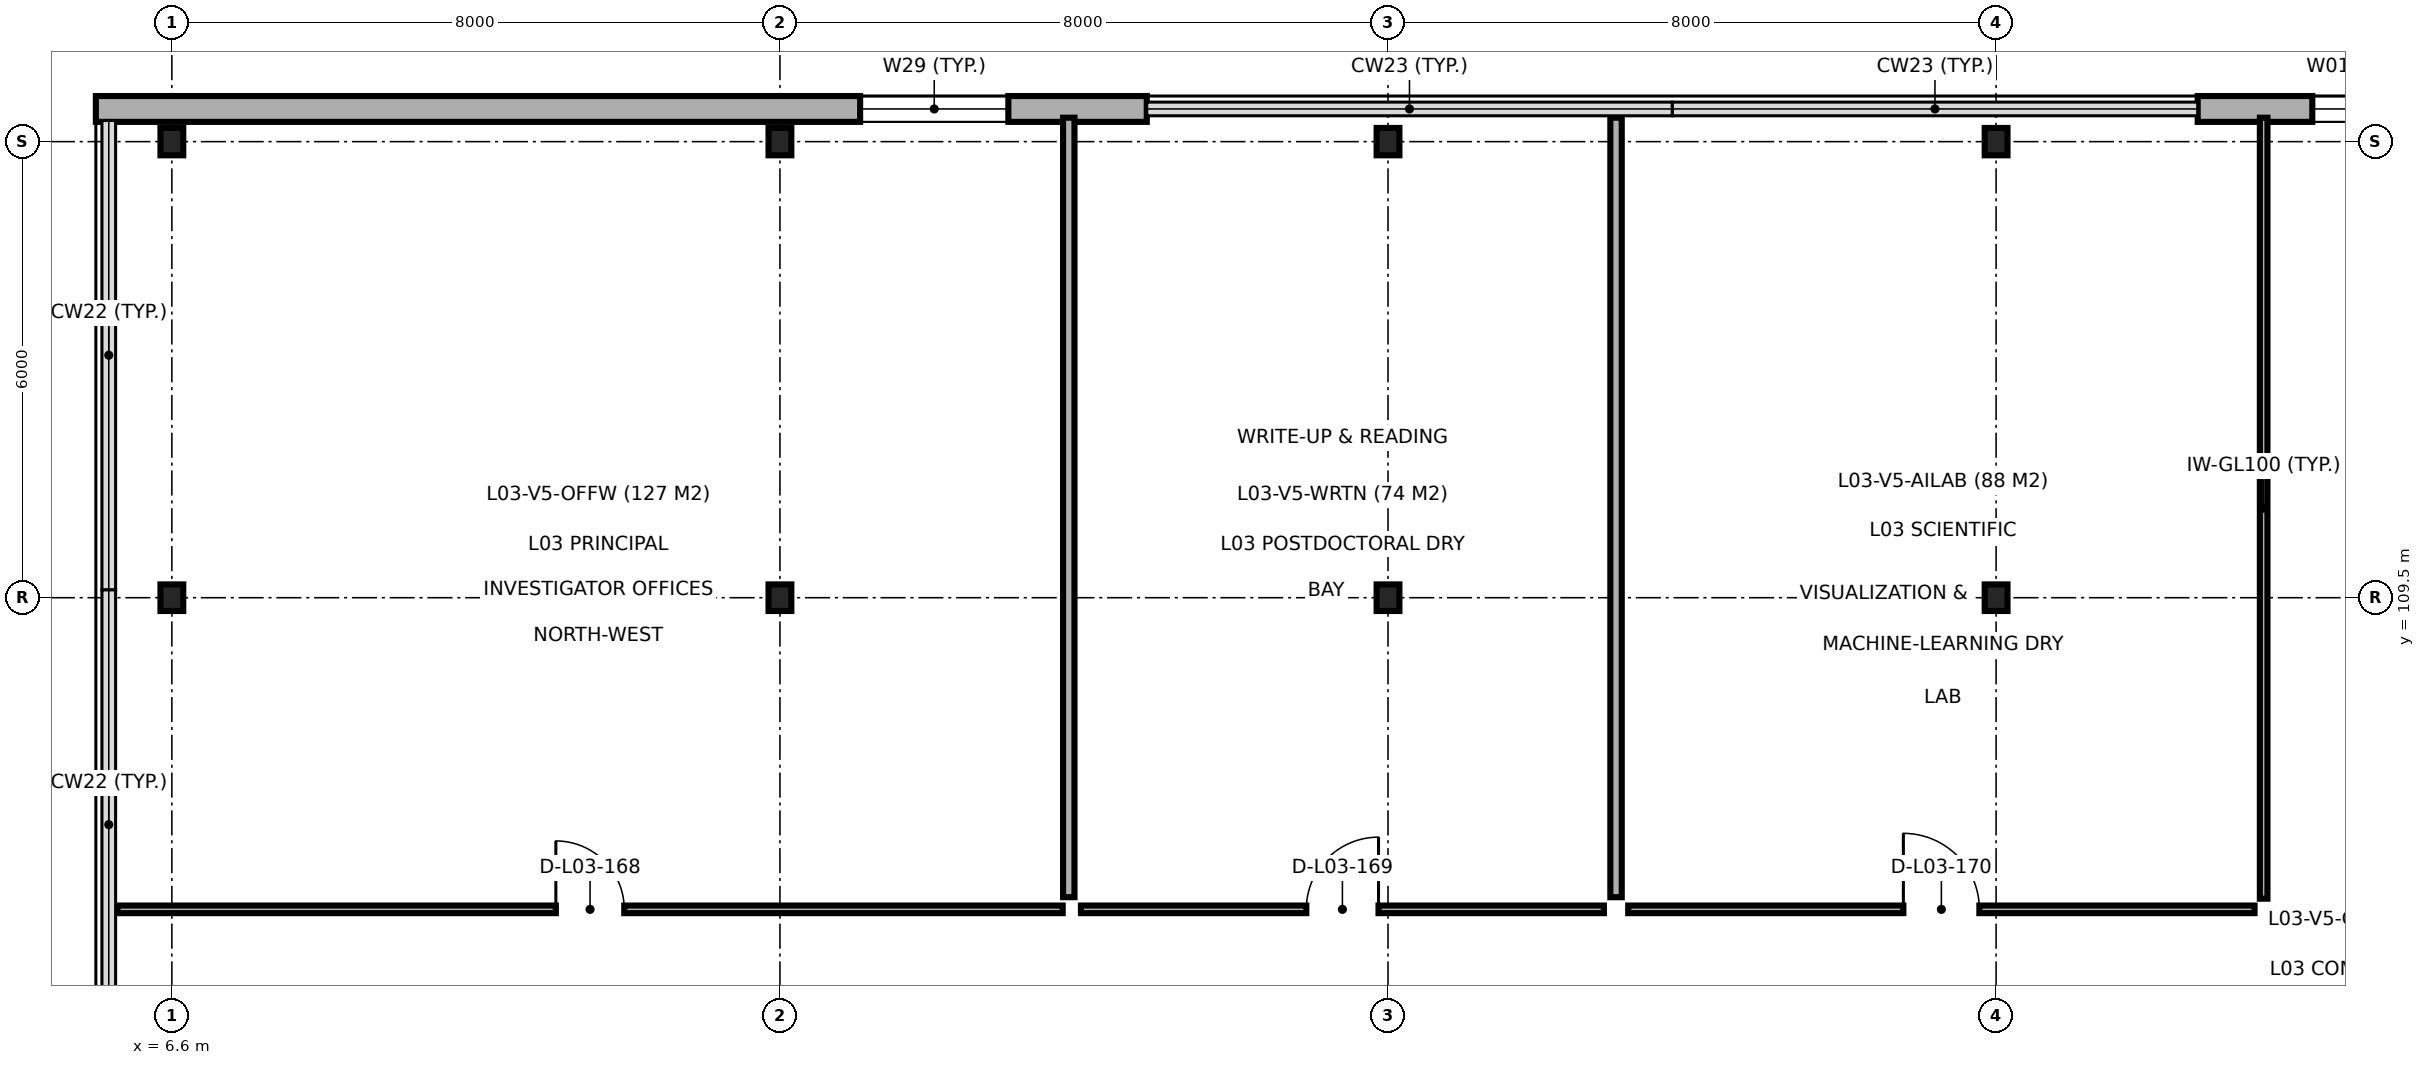
"""IFC4 building model, lengths in metres.
Left out: names, types, materials, properties, quantities, classifications, styles, units other than length and angle.
Written with IfcOpenShell. Run it as: python <this file> out.ifc"""

import sys

from ifc_helpers import new_model, si_unit, direction, frame, frame_2d, origin, origin_2d, place, context, subcontext, project, spatial, rectangle, i_section, extrude, element, fill, save


model = new_model("IFC4")
c1 = context("Model", 3, precision=1e-05, world=origin(), true_north=direction((0.0, 1.0)))
c2 = subcontext(c1, "Body", "Model", "MODEL_VIEW")
j1 = project(units=[si_unit("LENGTHUNIT", "METRE"), si_unit("PLANEANGLEUNIT", "RADIAN")], contexts=[c1])
p1 = place(None, origin())
s1 = spatial("IfcSite", under=j1, at=p1, CompositionType="ELEMENT")
p2 = place(p1, origin())
s2 = spatial("IfcBuilding", under=s1, at=p2, CompositionType="ELEMENT")
p3 = place(p2, frame((0.0, 0.0, 13.8)))
s3 = spatial("IfcBuildingStorey", under=s2, at=p3, CompositionType="ELEMENT", Elevation=13.8)
p4 = place(p3, frame((6.6, 109.5, 0.0), z_axis=(0.0, 0.0, 1.0), x_axis=(1.0, 0.0, 0.0)))
e1 = element("IfcColumn", 1, at=p4, inside=s3, PredefinedType="COLUMN", context=c2, shape_type="SweptSolid", body=[
    extrude(i_section(OverallWidth=0.3, OverallDepth=0.35, WebThickness=0.01, FlangeThickness=0.018, FilletRadius=0.027, at=origin_2d()), origin(), (0.0, 0.0, 1.0), 4.5),
])
p5 = place(p3, frame((6.6, 115.5, 0.0), z_axis=(0.0, 0.0, 1.0), x_axis=(1.0, 0.0, 0.0)))
e2 = element("IfcColumn", 2, at=p5, inside=s3, PredefinedType="COLUMN", context=c2, shape_type="SweptSolid", body=[
    extrude(i_section(OverallWidth=0.3, OverallDepth=0.36, WebThickness=0.012, FlangeThickness=0.022, FilletRadius=0.027, at=origin_2d()), origin(), (0.0, 0.0, 1.0), 4.5),
])
p6 = place(p3, frame((14.6, 109.5, 0.0), z_axis=(0.0, 0.0, 1.0), x_axis=(1.0, 0.0, 0.0)))
e3 = element("IfcColumn", 3, at=p6, inside=s3, PredefinedType="COLUMN", context=c2, shape_type="SweptSolid", body=[
    extrude(i_section(OverallWidth=0.3, OverallDepth=0.35, WebThickness=0.01, FlangeThickness=0.018, FilletRadius=0.027, at=origin_2d()), origin(), (0.0, 0.0, 1.0), 4.5),
])
p7 = place(p3, frame((14.6, 115.5, 0.0), z_axis=(0.0, 0.0, 1.0), x_axis=(1.0, 0.0, 0.0)))
e4 = element("IfcColumn", 4, at=p7, inside=s3, PredefinedType="COLUMN", context=c2, shape_type="SweptSolid", body=[
    extrude(i_section(OverallWidth=0.3, OverallDepth=0.36, WebThickness=0.012, FlangeThickness=0.022, FilletRadius=0.027, at=origin_2d()), origin(), (0.0, 0.0, 1.0), 4.5),
])
p8 = place(p3, frame((22.6, 109.5, 0.0), z_axis=(0.0, 0.0, 1.0), x_axis=(1.0, 0.0, 0.0)))
e5 = element("IfcColumn", 5, at=p8, inside=s3, PredefinedType="COLUMN", context=c2, shape_type="SweptSolid", body=[
    extrude(i_section(OverallWidth=0.3, OverallDepth=0.35, WebThickness=0.01, FlangeThickness=0.018, FilletRadius=0.027, at=origin_2d()), origin(), (0.0, 0.0, 1.0), 4.5),
])
p9 = place(p3, frame((22.6, 115.5, 0.0), z_axis=(0.0, 0.0, 1.0), x_axis=(1.0, 0.0, 0.0)))
e6 = element("IfcColumn", 6, at=p9, inside=s3, PredefinedType="COLUMN", context=c2, shape_type="SweptSolid", body=[
    extrude(i_section(OverallWidth=0.3, OverallDepth=0.36, WebThickness=0.012, FlangeThickness=0.022, FilletRadius=0.027, at=origin_2d()), origin(), (0.0, 0.0, 1.0), 4.5),
])
p10 = place(p3, frame((30.6, 109.5, 0.0), z_axis=(0.0, 0.0, 1.0), x_axis=(1.0, 0.0, 0.0)))
e7 = element("IfcColumn", 7, at=p10, inside=s3, PredefinedType="COLUMN", context=c2, shape_type="SweptSolid", body=[
    extrude(i_section(OverallWidth=0.3, OverallDepth=0.35, WebThickness=0.01, FlangeThickness=0.018, FilletRadius=0.027, at=origin_2d()), origin(), (0.0, 0.0, 1.0), 4.5),
])
p11 = place(p3, frame((30.6, 115.5, 0.0), z_axis=(0.0, 0.0, 1.0), x_axis=(1.0, 0.0, 0.0)))
e8 = element("IfcColumn", 8, at=p11, inside=s3, PredefinedType="COLUMN", context=c2, shape_type="SweptSolid", body=[
    extrude(i_section(OverallWidth=0.3, OverallDepth=0.36, WebThickness=0.012, FlangeThickness=0.022, FilletRadius=0.027, at=origin_2d()), origin(), (0.0, 0.0, 1.0), 4.5),
])
p12 = place(p3, frame((47.078, 115.93, 0.0), z_axis=(0.0, 0.0, 1.0), x_axis=(-1.0, 0.0, 0.0)))
e9 = element("IfcWall", 9, at=p12, inside=s3, PredefinedType="SOLIDWALL", context=c2, shape_type="SweptSolid", body=[
    extrude(rectangle(XDim=13.826, YDim=0.34, at=frame_2d((6.913, 0.0))), origin(), (0.0, 0.0, 1.0), 4.25),
])
p13 = place(p12, frame((9.158, 0.0, 0.9)))
e10 = element("IfcOpeningElement", 10, at=p13, cuts=e9, PredefinedType="OPENING", context=c2, shape_type="SweptSolid", body=[
    extrude(rectangle(XDim=0.9, YDim=1.8, at=frame_2d((0.45, 0.9))), frame((0.0, 0.18, 0.0), z_axis=(0.0, -1.0, 0.0), x_axis=(1.0, 0.0, 0.0)), (0.0, 0.0, 1.0), 0.36),
])
p14 = place(p12, frame((11.118, 0.0, 0.9)))
e11 = element("IfcOpeningElement", 11, at=p14, cuts=e9, PredefinedType="OPENING", context=c2, shape_type="SweptSolid", body=[
    extrude(rectangle(XDim=1.2, YDim=1.8, at=frame_2d((0.6, 0.9))), frame((0.0, 0.18, 0.0), z_axis=(0.0, -1.0, 0.0), x_axis=(1.0, 0.0, 0.0)), (0.0, 0.0, 1.0), 0.36),
])
p15 = place(p3, frame((19.426, 115.93, 0.0), z_axis=(0.0, 0.0, 1.0), x_axis=(-1.0, 0.0, 0.0)))
e12 = element("IfcWall", 12, at=p15, inside=s3, PredefinedType="SOLIDWALL", context=c2, shape_type="SweptSolid", body=[
    extrude(rectangle(XDim=13.826, YDim=0.34, at=frame_2d((6.913, 0.0))), origin(), (0.0, 0.0, 1.0), 4.25),
])
p16 = place(p15, frame((1.821, 0.0, 0.9)))
e13 = element("IfcOpeningElement", 13, at=p16, cuts=e12, PredefinedType="OPENING", context=c2, shape_type="SweptSolid", body=[
    extrude(rectangle(XDim=1.95, YDim=1.95, at=frame_2d((0.975, 0.975))), frame((0.0, 0.18, 0.0), z_axis=(0.0, -1.0, 0.0), x_axis=(1.0, 0.0, 0.0)), (0.0, 0.0, 1.0), 0.36),
])
p17 = place(p3, frame((18.4, 105.56, 0.0), z_axis=(0.0, 0.0, 1.0), x_axis=(0.0, 1.0, 0.0)))
e14 = element("IfcWall", 14, at=p17, inside=s3, PredefinedType="PARTITIONING", context=c2, shape_type="SweptSolid", body=[
    extrude(rectangle(XDim=10.255, YDim=0.15, at=frame_2d((5.127, 0.0))), origin(), (0.0, 0.0, 1.0), 4.25),
])
p18 = place(p3, frame((25.6, 105.56, 0.0), z_axis=(0.0, 0.0, 1.0), x_axis=(0.0, 1.0, 0.0)))
e15 = element("IfcWall", 15, at=p18, inside=s3, PredefinedType="PARTITIONING", context=c2, shape_type="SweptSolid", body=[
    extrude(rectangle(XDim=10.255, YDim=0.15, at=frame_2d((5.127, 0.0))), origin(), (0.0, 0.0, 1.0), 3.95),
])
p19 = place(p3, frame((34.12, 105.54, 0.0), z_axis=(0.0, 0.0, 1.0), x_axis=(0.0, 1.0, 0.0)))
e16 = element("IfcWall", 16, at=p19, inside=s3, PredefinedType="PARTITIONING", context=c2, shape_type="SweptSolid", body=[
    extrude(rectangle(XDim=10.275, YDim=0.1, at=frame_2d((5.137, 0.0))), origin(), (0.0, 0.0, 1.0), 4.25),
])
p20 = place(p3, frame((5.885, 105.4, 0.0), z_axis=(0.0, 0.0, 1.0), x_axis=(1.0, 0.0, 0.0)))
e17 = element("IfcWall", 17, at=p20, inside=s3, PredefinedType="PARTITIONING", context=c2, shape_type="SweptSolid", body=[
    extrude(rectangle(XDim=12.435, YDim=0.1, at=frame_2d((6.218, 0.0))), origin(), (0.0, 0.0, 1.0), 4.25),
])
p21 = place(p20, frame((5.767, 0.0, 0.0)))
e18 = element("IfcOpeningElement", 18, at=p21, cuts=e17, PredefinedType="OPENING", context=c2, shape_type="SweptSolid", body=[
    extrude(rectangle(XDim=0.9, YDim=2.1, at=frame_2d((0.45, 1.05))), frame((0.0, 0.06, 0.0), z_axis=(0.0, -1.0, 0.0), x_axis=(1.0, 0.0, 0.0)), (0.0, 0.0, 1.0), 0.12),
])
p22 = place(p3, frame((18.56, 105.4, 0.0), z_axis=(0.0, 0.0, 1.0), x_axis=(1.0, 0.0, 0.0)))
e19 = element("IfcWall", 19, at=p22, inside=s3, PredefinedType="PARTITIONING", context=c2, shape_type="SweptSolid", body=[
    extrude(rectangle(XDim=6.88, YDim=0.1, at=frame_2d((3.44, 0.0))), origin(), (0.0, 0.0, 1.0), 4.25),
])
p23 = place(p22, frame((2.965, 0.0, 0.0)))
e20 = element("IfcOpeningElement", 20, at=p23, cuts=e19, PredefinedType="OPENING", context=c2, shape_type="SweptSolid", body=[
    extrude(rectangle(XDim=0.95, YDim=2.1, at=frame_2d((0.475, 1.05))), frame((0.0, 0.06, 0.0), z_axis=(0.0, -1.0, 0.0), x_axis=(1.0, 0.0, 0.0)), (0.0, 0.0, 1.0), 0.12),
])
p24 = place(p3, frame((25.76, 105.4, 0.0), z_axis=(0.0, 0.0, 1.0), x_axis=(1.0, 0.0, 0.0)))
e21 = element("IfcWall", 21, at=p24, inside=s3, PredefinedType="PARTITIONING", context=c2, shape_type="SweptSolid", body=[
    extrude(rectangle(XDim=8.24, YDim=0.1, at=frame_2d((4.12, 0.0))), origin(), (0.0, 0.0, 1.0), 4.25),
])
p25 = place(p24, frame((3.62, 0.0, 0.0)))
e22 = element("IfcOpeningElement", 22, at=p25, cuts=e21, PredefinedType="OPENING", context=c2, shape_type="SweptSolid", body=[
    extrude(rectangle(XDim=1.0, YDim=2.15, at=frame_2d((0.5, 1.075))), frame((0.0, 0.06, 0.0), z_axis=(0.0, -1.0, 0.0), x_axis=(1.0, 0.0, 0.0)), (0.0, 0.0, 1.0), 0.12),
])
p26 = place(p14, origin())
e23 = element("IfcWindow", 23, at=p26, inside=s3, PartitioningType="SINGLE_PANEL", PredefinedType="WINDOW", context=c2, shape_type="SweptSolid", body=[
    extrude(rectangle(XDim=1.2, YDim=1.8, at=frame_2d((0.6, 0.9))), frame((0.0, 0.03, 0.0), z_axis=(0.0, -1.0, 0.0), x_axis=(1.0, 0.0, 0.0)), (0.0, 0.0, 1.0), 0.06),
])
fill(e11, e23)
p27 = place(p16, origin())
e24 = element("IfcWindow", 24, at=p27, inside=s3, PartitioningType="SINGLE_PANEL", PredefinedType="WINDOW", context=c2, shape_type="SweptSolid", body=[
    extrude(rectangle(XDim=1.95, YDim=1.95, at=frame_2d((0.975, 0.975))), frame((0.0, 0.03, 0.0), z_axis=(0.0, -1.0, 0.0), x_axis=(1.0, 0.0, 0.0)), (0.0, 0.0, 1.0), 0.06),
])
fill(e13, e24)
p28 = place(p21, origin())
e25 = element("IfcDoor", 25, at=p28, inside=s3, OperationType="SINGLE_SWING_LEFT", PredefinedType="DOOR", context=c2, shape_type="SweptSolid", body=[
    extrude(rectangle(XDim=0.9, YDim=2.1, at=frame_2d((0.45, 1.05))), frame((0.0, 0.025, 0.0), z_axis=(0.0, -1.0, 0.0), x_axis=(1.0, 0.0, 0.0)), (0.0, 0.0, 1.0), 0.05),
])
fill(e18, e25)
p29 = place(p23, origin())
e26 = element("IfcDoor", 26, at=p29, inside=s3, OperationType="SINGLE_SWING_RIGHT", PredefinedType="DOOR", context=c2, shape_type="SweptSolid", body=[
    extrude(rectangle(XDim=0.95, YDim=2.1, at=frame_2d((0.475, 1.05))), frame((0.0, 0.025, 0.0), z_axis=(0.0, -1.0, 0.0), x_axis=(1.0, 0.0, 0.0)), (0.0, 0.0, 1.0), 0.05),
])
fill(e20, e26)
p30 = place(p25, origin())
e27 = element("IfcDoor", 27, at=p30, inside=s3, OperationType="SINGLE_SWING_LEFT", PredefinedType="DOOR", context=c2, shape_type="SweptSolid", body=[
    extrude(rectangle(XDim=1.0, YDim=2.15, at=frame_2d((0.5, 1.075))), frame((0.0, 0.025, 0.0), z_axis=(0.0, -1.0, 0.0), x_axis=(1.0, 0.0, 0.0)), (0.0, 0.0, 1.0), 0.05),
])
fill(e22, e27)
save(model, sys.argv[1])
